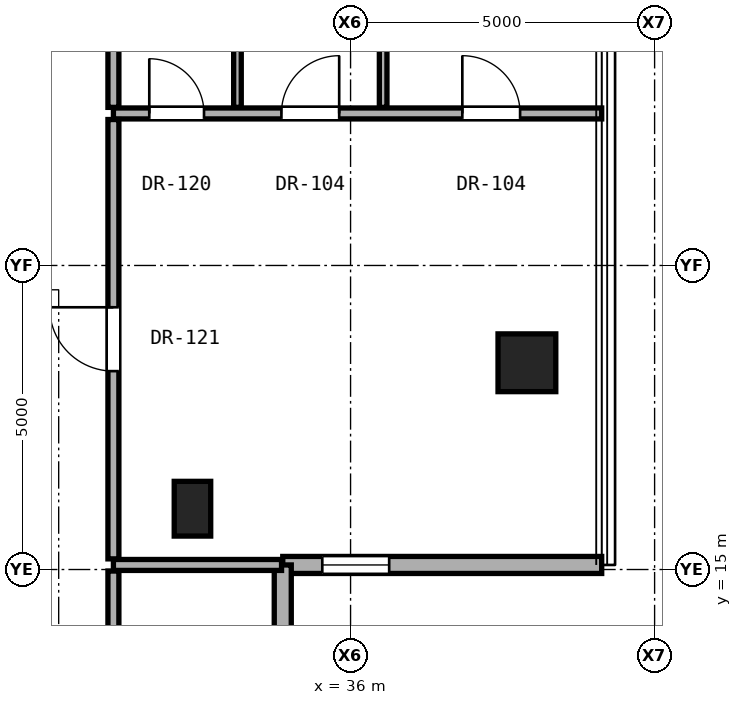
"""IFC4 building model, lengths in metres.
Left out: names, types, materials, properties, quantities, classifications, styles, units other than length and angle.
Written with IfcOpenShell. Run it as: python <this file> out.ifc"""

import sys

from ifc_helpers import new_model, si_unit, direction, frame, frame_2d, origin, origin_2d, place, context, subcontext, project, spatial, rectangle, hollow_rectangle, extrude, element, fill, save


model = new_model("IFC4")
c1 = context("Model", 3, precision=1e-05, world=origin(), true_north=direction((0.0, 1.0)))
c2 = subcontext(c1, "Body", "Model", "MODEL_VIEW")
j1 = project(units=[si_unit("LENGTHUNIT", "METRE"), si_unit("PLANEANGLEUNIT", "RADIAN")], contexts=[c1])
p1 = place(None, origin())
s1 = spatial("IfcSite", under=j1, at=p1, CompositionType="ELEMENT")
p2 = place(p1, origin())
s2 = spatial("IfcBuilding", under=s1, at=p2, CompositionType="ELEMENT")
p3 = place(p2, frame((0.0, 0.0, 154.4)))
s3 = spatial("IfcBuildingStorey", under=s2, at=p3, CompositionType="ELEMENT", Elevation=154.4)
p4 = place(p3, frame((38.9, 18.4, 0.0), z_axis=(0.0, 0.0, 1.0), x_axis=(1.0, 0.0, 0.0)))
e1 = element("IfcColumn", 1, at=p4, inside=s3, PredefinedType="COLUMN", context=c2, shape_type="SweptSolid", body=[
    extrude(hollow_rectangle(XDim=0.95, YDim=0.95, WallThickness=0.05, at=origin_2d()), origin(), (0.0, 0.0, 1.0), 3.25),
])
p5 = place(p3, frame((33.4, 16.0, 0.0), z_axis=(0.0, 0.0, 1.0), x_axis=(1.0, 0.0, 0.0)))
e2 = element("IfcColumn", 2, at=p5, inside=s3, PredefinedType="PILASTER", context=c2, shape_type="SweptSolid", body=[
    extrude(rectangle(XDim=0.6, YDim=0.9, at=origin_2d()), origin(), (0.0, 0.0, 1.0), 3.25),
])
p6 = place(p3, frame((34.885, 15.075, 0.0), z_axis=(0.0, 0.0, 1.0), x_axis=(1.0, 0.0, 0.0)))
e3 = element("IfcWall", 3, at=p6, inside=s3, PredefinedType="SOLIDWALL", context=c2, shape_type="SweptSolid", body=[
    extrude(rectangle(XDim=5.245, YDim=0.28, at=frame_2d((2.623, 0.0))), origin(), (0.0, 0.0, 1.0), 3.03),
])
p7 = place(p6, frame((0.65, 0.0, 0.85)))
e4 = element("IfcOpeningElement", 4, at=p7, cuts=e3, PredefinedType="OPENING", context=c2, shape_type="SweptSolid", body=[
    extrude(rectangle(XDim=1.1, YDim=2.0, at=frame_2d((0.55, 1.0))), frame((0.0, 0.15, 0.0), z_axis=(0.0, -1.0, 0.0), x_axis=(1.0, 0.0, 0.0)), (0.0, 0.0, 1.0), 0.3),
])
p8 = place(p3, frame((34.885, 9.83, 0.0), z_axis=(0.0, 0.0, 1.0), x_axis=(0.0, 1.0, 0.0)))
e5 = element("IfcWall", 5, at=p8, inside=s3, PredefinedType="SOLIDWALL", context=c2, shape_type="SweptSolid", body=[
    extrude(rectangle(XDim=5.245, YDim=0.28, at=frame_2d((2.623, 0.0))), origin(), (0.0, 0.0, 1.0), 3.03),
])
p9 = place(p3, frame((32.1, 15.075, 0.0), z_axis=(0.0, 0.0, 1.0), x_axis=(1.0, 0.0, 0.0)))
e6 = element("IfcWall", 6, at=p9, inside=s3, PredefinedType="PARTITIONING", context=c2, shape_type="SweptSolid", body=[
    extrude(rectangle(XDim=2.765, YDim=0.18, at=frame_2d((1.382, 0.0))), origin(), (0.0, 0.0, 1.0), 3.05),
])
p10 = place(p3, frame((32.1, 22.5, 0.0), z_axis=(0.0, 0.0, 1.0), x_axis=(1.0, 0.0, 0.0)))
e7 = element("IfcWall", 7, at=p10, inside=s3, PredefinedType="PARTITIONING", context=c2, shape_type="SweptSolid", body=[
    extrude(rectangle(XDim=8.03, YDim=0.18, at=frame_2d((4.015, 0.0))), origin(), (0.0, 0.0, 1.0), 2.269),
])
p11 = place(p10, frame((5.738, 0.0, 0.0)))
e8 = element("IfcOpeningElement", 8, at=p11, cuts=e7, PredefinedType="OPENING", context=c2, shape_type="SweptSolid", body=[
    extrude(rectangle(XDim=0.95, YDim=2.15, at=frame_2d((0.475, 1.075))), frame((0.0, 0.1, 0.0), z_axis=(0.0, -1.0, 0.0), x_axis=(1.0, 0.0, 0.0)), (0.0, 0.0, 1.0), 0.2),
])
p12 = place(p10, frame((2.763, 0.0, 0.0)))
e9 = element("IfcOpeningElement", 9, at=p12, cuts=e7, PredefinedType="OPENING", context=c2, shape_type="SweptSolid", body=[
    extrude(rectangle(XDim=0.95, YDim=2.15, at=frame_2d((0.475, 1.075))), frame((0.0, 0.1, 0.0), z_axis=(0.0, -1.0, 0.0), x_axis=(1.0, 0.0, 0.0)), (0.0, 0.0, 1.0), 0.2),
])
p13 = place(p10, frame((0.59, 0.0, 0.0)))
e10 = element("IfcOpeningElement", 10, at=p13, cuts=e7, PredefinedType="OPENING", context=c2, shape_type="SweptSolid", body=[
    extrude(rectangle(XDim=0.9, YDim=2.1, at=frame_2d((0.45, 1.05))), frame((0.0, 0.1, 0.0), z_axis=(0.0, -1.0, 0.0), x_axis=(1.0, 0.0, 0.0)), (0.0, 0.0, 1.0), 0.2),
])
p14 = place(p3, frame((32.1, 9.83, 0.0), z_axis=(0.0, 0.0, 1.0), x_axis=(0.0, 1.0, 0.0)))
e11 = element("IfcWall", 11, at=p14, inside=s3, PredefinedType="PARTITIONING", context=c2, shape_type="SweptSolid", body=[
    extrude(rectangle(XDim=5.145, YDim=0.18, at=frame_2d((2.573, 0.0))), origin(), (0.0, 0.0, 1.0), 3.05),
])
p15 = place(p14, frame((2.097, 0.0, 0.0)))
e12 = element("IfcOpeningElement", 12, at=p15, cuts=e11, PredefinedType="OPENING", context=c2, shape_type="SweptSolid", body=[
    extrude(rectangle(XDim=0.95, YDim=2.15, at=frame_2d((0.475, 1.075))), frame((0.0, 0.1, 0.0), z_axis=(0.0, -1.0, 0.0), x_axis=(1.0, 0.0, 0.0)), (0.0, 0.0, 1.0), 0.2),
])
p16 = place(p3, frame((32.1, 15.175, 0.0), z_axis=(0.0, 0.0, 1.0), x_axis=(0.0, 1.0, 0.0)))
e13 = element("IfcWall", 13, at=p16, inside=s3, PredefinedType="PARTITIONING", context=c2, shape_type="SweptSolid", body=[
    extrude(rectangle(XDim=7.225, YDim=0.18, at=frame_2d((3.612, 0.0))), origin(), (0.0, 0.0, 1.0), 2.442),
])
p17 = place(p16, frame((3.087, 0.0, 0.0)))
e14 = element("IfcOpeningElement", 14, at=p17, cuts=e13, PredefinedType="OPENING", context=c2, shape_type="SweptSolid", body=[
    extrude(rectangle(XDim=1.05, YDim=2.2, at=frame_2d((0.525, 1.1))), frame((0.0, 0.1, 0.0), z_axis=(0.0, -1.0, 0.0), x_axis=(1.0, 0.0, 0.0)), (0.0, 0.0, 1.0), 0.2),
])
p18 = place(p3, frame((32.1, 22.6, 0.0), z_axis=(0.0, 0.0, 1.0), x_axis=(0.0, 1.0, 0.0)))
e15 = element("IfcWall", 15, at=p18, inside=s3, PredefinedType="PARTITIONING", context=c2, shape_type="SweptSolid", body=[
    extrude(rectangle(XDim=2.1, YDim=0.18, at=frame_2d((1.05, 0.0))), origin(), (0.0, 0.0, 1.0), 2.346),
])
for number, where, z_axis, x_axis in (
    (16, (34.14, 22.6, 0.0), (0.0, 0.0, 1.0), (0.0, 1.0, 0.0)),
    (17, (36.536, 22.6, 0.0), (0.0, 0.0, 1.0), (0.0, 1.0, 0.0)),
):
    element("IfcWall", number, at=place(p3, frame(where, z_axis=z_axis, x_axis=x_axis)), inside=s3, PredefinedType="PARTITIONING", context=c2, shape_type="SweptSolid", body=[
        extrude(rectangle(XDim=2.1, YDim=0.125, at=frame_2d((1.05, 0.0))), origin(), (0.0, 0.0, 1.0), 2.346),
    ])
p19 = place(p7, origin())
e18 = element("IfcWindow", 18, at=p19, inside=s3, PartitioningType="SINGLE_PANEL", PredefinedType="WINDOW", context=c2, shape_type="SweptSolid", body=[
    extrude(rectangle(XDim=1.1, YDim=2.0, at=frame_2d((0.55, 1.0))), frame((0.0, 0.03, 0.0), z_axis=(0.0, -1.0, 0.0), x_axis=(1.0, 0.0, 0.0)), (0.0, 0.0, 1.0), 0.06),
])
fill(e4, e18)
p20 = place(p17, origin())
e19 = element("IfcDoor", 19, at=p20, inside=s3, OperationType="SINGLE_SWING_RIGHT", PredefinedType="DOOR", context=c2, shape_type="SweptSolid", body=[
    extrude(rectangle(XDim=1.05, YDim=2.2, at=frame_2d((0.525, 1.1))), frame((0.0, 0.025, 0.0), z_axis=(0.0, -1.0, 0.0), x_axis=(1.0, 0.0, 0.0)), (0.0, 0.0, 1.0), 0.05),
])
fill(e14, e19)
p21 = place(p11, origin())
e20 = element("IfcDoor", 20, at=p21, inside=s3, OperationType="SINGLE_SWING_LEFT", PredefinedType="DOOR", context=c2, shape_type="SweptSolid", body=[
    extrude(rectangle(XDim=0.95, YDim=2.15, at=frame_2d((0.475, 1.075))), frame((0.0, 0.025, 0.0), z_axis=(0.0, -1.0, 0.0), x_axis=(1.0, 0.0, 0.0)), (0.0, 0.0, 1.0), 0.05),
])
fill(e8, e20)
p22 = place(p12, origin())
e21 = element("IfcDoor", 21, at=p22, inside=s3, OperationType="SINGLE_SWING_RIGHT", PredefinedType="DOOR", context=c2, shape_type="SweptSolid", body=[
    extrude(rectangle(XDim=0.95, YDim=2.15, at=frame_2d((0.475, 1.075))), frame((0.0, 0.025, 0.0), z_axis=(0.0, -1.0, 0.0), x_axis=(1.0, 0.0, 0.0)), (0.0, 0.0, 1.0), 0.05),
])
fill(e9, e21)
p23 = place(p13, origin())
e22 = element("IfcDoor", 22, at=p23, inside=s3, OperationType="SINGLE_SWING_LEFT", PredefinedType="DOOR", context=c2, shape_type="SweptSolid", body=[
    extrude(rectangle(XDim=0.9, YDim=2.1, at=frame_2d((0.45, 1.05))), frame((0.0, 0.025, 0.0), z_axis=(0.0, -1.0, 0.0), x_axis=(1.0, 0.0, 0.0)), (0.0, 0.0, 1.0), 0.05),
])
fill(e10, e22)
save(model, sys.argv[1])
